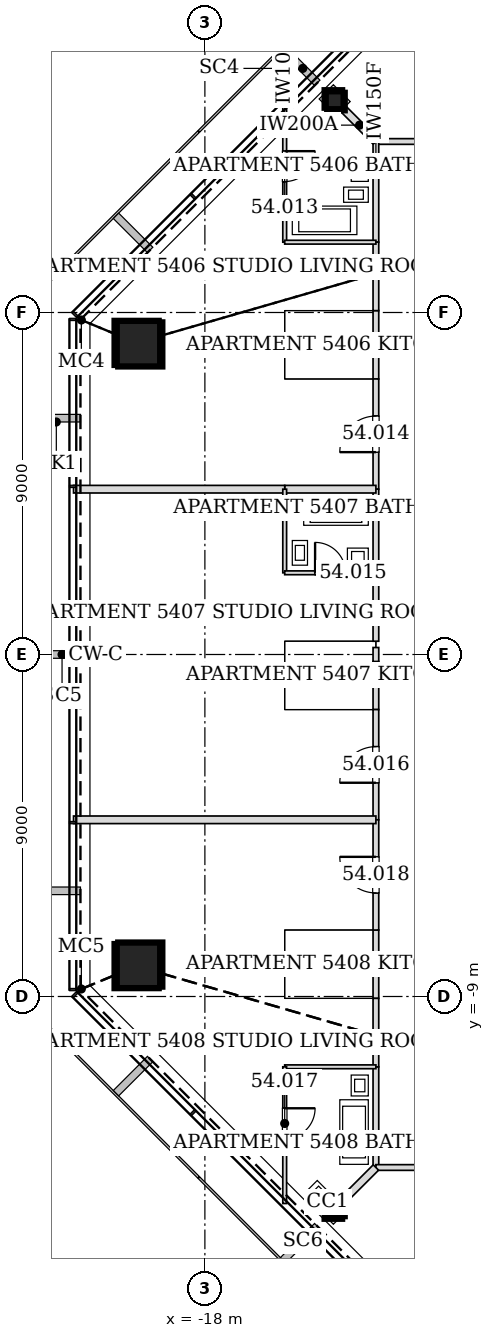
"""IFC4 building model, lengths in metres.
Left out: names, types, materials, properties, quantities, classifications, styles, units other than length and angle.
Written with IfcOpenShell. Run it as: python <this file> out.ifc"""

import sys

from ifc_helpers import new_model, si_unit, direction, frame, frame_2d, origin, origin_2d, place, context, subcontext, project, spatial, rectangle, hollow_rectangle, extrude, element, fill, save


model = new_model("IFC4")
c1 = context("Model", 3, precision=1e-05, world=origin(), true_north=direction((0.0, 1.0)))
c2 = subcontext(c1, "Body", "Model", "MODEL_VIEW")
j1 = project(units=[si_unit("LENGTHUNIT", "METRE"), si_unit("PLANEANGLEUNIT", "RADIAN")], contexts=[c1])
p1 = place(None, origin())
s1 = spatial("IfcSite", under=j1, at=p1, CompositionType="ELEMENT")
p2 = place(p1, origin())
s2 = spatial("IfcBuilding", under=s1, at=p2, CompositionType="ELEMENT")
p3 = place(p2, frame((0.0, 0.0, 231.2)))
s3 = spatial("IfcBuildingStorey", under=s2, at=p3, CompositionType="ELEMENT", Elevation=231.2)
for number, where, z_axis, x_axis in (
    (1, (-19.796, 8.2, 0.0), (0.028, -0.012, 1.0), (0.384, 0.923, 0.0)),
    (2, (-19.796, -8.2, 0.0), (0.028, 0.012, 1.0), (-0.384, 0.923, 0.0)),
):
    element("IfcColumn", number, at=place(p3, frame(where, z_axis=z_axis, x_axis=x_axis)), inside=s3, PredefinedType="COLUMN", context=c2, shape_type="SweptSolid", body=[
        extrude(hollow_rectangle(XDim=1.2, YDim=1.2, WallThickness=0.055, at=origin_2d()), origin(), (0.0, 0.0, 1.0), 3.402),
    ])
for number, where, z_axis, x_axis in (
    (3, (-14.619, 14.619, 0.0), (0.02, -0.02, 1.0), (0.707, 0.707, 0.0)),
    (4, (-20.674, 0.0, 0.0), (0.028, 0.0, 1.0), (0.0, 1.0, 0.0)),
    (5, (-14.619, -14.619, 0.0), (0.02, 0.02, 1.0), (-0.707, 0.707, 0.0)),
):
    element("IfcColumn", number, at=place(p3, frame(where, z_axis=z_axis, x_axis=x_axis)), inside=s3, PredefinedType="COLUMN", context=c2, shape_type="SweptSolid", body=[
        extrude(hollow_rectangle(XDim=0.5, YDim=0.5, WallThickness=0.025, at=origin_2d()), origin(), (0.0, 0.0, 1.0), 3.402),
    ])
p4 = place(p3, frame((-9.449, 13.5, 0.0), z_axis=(0.0, 0.0, 1.0), x_axis=(-1.0, 0.0, 0.0)))
e6 = element("IfcWall", 6, at=p4, inside=s3, PredefinedType="PARTITIONING", context=c2, shape_type="SweptSolid", body=[
    extrude(rectangle(XDim=4.051, YDim=0.15, at=frame_2d((2.025, 0.0))), origin(), (0.0, 0.0, 1.0), 2.344),
])
p5 = place(p3, frame((-13.5, 13.5, 0.0), z_axis=(0.0, 0.0, 1.0), x_axis=(0.0, -1.0, 0.0)))
e7 = element("IfcWall", 7, at=p5, inside=s3, PredefinedType="PARTITIONING", context=c2, shape_type="SweptSolid", body=[
    extrude(rectangle(XDim=2.651, YDim=0.15, at=frame_2d((1.325, 0.0))), origin(), (0.0, 0.0, 1.0), 2.583),
])
p6 = place(p3, frame((-13.5, 9.051, 0.0), z_axis=(0.0, 0.0, 1.0), x_axis=(0.0, -1.0, 0.0)))
e8 = element("IfcWall", 8, at=p6, inside=s3, PredefinedType="PARTITIONING", context=c2, shape_type="SweptSolid", body=[
    extrude(rectangle(XDim=1.802, YDim=0.15, at=frame_2d((0.901, 0.0))), origin(), (0.0, 0.0, 1.0), 3.2),
])
p7 = place(p3, frame((-13.5, 7.251, 0.0), z_axis=(0.0, 0.0, 1.0), x_axis=(0.0, -1.0, 0.0)))
e9 = element("IfcWall", 9, at=p7, inside=s3, PredefinedType="PARTITIONING", context=c2, shape_type="SweptSolid", body=[
    extrude(rectangle(XDim=2.902, YDim=0.15, at=frame_2d((1.451, 0.0))), origin(), (0.0, 0.0, 1.0), 3.2),
])
p8 = place(p7, frame((0.976, 0.0, 0.0)))
e10 = element("IfcOpeningElement", 10, at=p8, cuts=e9, PredefinedType="OPENING", context=c2, shape_type="SweptSolid", body=[
    extrude(rectangle(XDim=0.95, YDim=2.1, at=frame_2d((0.475, 1.05))), frame((0.0, 0.085, 0.0), z_axis=(0.0, -1.0, 0.0), x_axis=(1.0, 0.0, 0.0)), (0.0, 0.0, 1.0), 0.17),
])
p9 = place(p3, frame((-13.5, 10.851, 0.0), z_axis=(0.0, 0.0, 1.0), x_axis=(0.0, -1.0, 0.0)))
e11 = element("IfcWall", 11, at=p9, inside=s3, PredefinedType="PARTITIONING", context=c2, shape_type="SweptSolid", body=[
    extrude(rectangle(XDim=1.802, YDim=0.15, at=frame_2d((0.901, 0.0))), origin(), (0.0, 0.0, 1.0), 2.344),
])
p10 = place(p3, frame((-13.5, 4.351, 0.0), z_axis=(0.0, 0.0, 1.0), x_axis=(0.0, -1.0, 0.0)))
e12 = element("IfcWall", 12, at=p10, inside=s3, PredefinedType="PARTITIONING", context=c2, shape_type="SweptSolid", body=[
    extrude(rectangle(XDim=2.202, YDim=0.15, at=frame_2d((1.101, 0.0))), origin(), (0.0, 0.0, 1.0), 3.2),
])
p11 = place(p3, frame((-13.5, -0.184, 0.0), z_axis=(0.0, 0.0, 1.0), x_axis=(0.0, -1.0, 0.0)))
e13 = element("IfcWall", 13, at=p11, inside=s3, PredefinedType="PARTITIONING", context=c2, shape_type="SweptSolid", body=[
    extrude(rectangle(XDim=1.267, YDim=0.15, at=frame_2d((0.634, 0.0))), origin(), (0.0, 0.0, 1.0), 3.2),
])
p12 = place(p3, frame((-13.5, 0.184, 0.0), z_axis=(0.0, 0.0, 1.0), x_axis=(0.0, -1.0, 0.0)))
e14 = element("IfcWall", 14, at=p12, inside=s3, PredefinedType="PARTITIONING", context=c2, shape_type="SweptSolid", body=[
    extrude(rectangle(XDim=0.367, YDim=0.15, at=frame_2d((0.184, 0.0))), origin(), (0.0, 0.0, 1.0), 2.253),
])
p13 = place(p3, frame((-13.5, -1.449, 0.0), z_axis=(0.0, 0.0, 1.0), x_axis=(0.0, -1.0, 0.0)))
e15 = element("IfcWall", 15, at=p13, inside=s3, PredefinedType="PARTITIONING", context=c2, shape_type="SweptSolid", body=[
    extrude(rectangle(XDim=2.902, YDim=0.15, at=frame_2d((1.451, 0.0))), origin(), (0.0, 0.0, 1.0), 3.2),
])
p14 = place(p13, frame((0.976, 0.0, 0.0)))
e16 = element("IfcOpeningElement", 16, at=p14, cuts=e15, PredefinedType="OPENING", context=c2, shape_type="SweptSolid", body=[
    extrude(rectangle(XDim=0.95, YDim=2.1, at=frame_2d((0.475, 1.05))), frame((0.0, 0.085, 0.0), z_axis=(0.0, -1.0, 0.0), x_axis=(1.0, 0.0, 0.0)), (0.0, 0.0, 1.0), 0.17),
])
p15 = place(p3, frame((-13.5, 2.151, 0.0), z_axis=(0.0, 0.0, 1.0), x_axis=(0.0, -1.0, 0.0)))
e17 = element("IfcWall", 17, at=p15, inside=s3, PredefinedType="PARTITIONING", context=c2, shape_type="SweptSolid", body=[
    extrude(rectangle(XDim=1.802, YDim=0.15, at=frame_2d((0.901, 0.0))), origin(), (0.0, 0.0, 1.0), 3.2),
])
p16 = place(p3, frame((-13.5, -10.849, 0.0), z_axis=(0.0, 0.0, 1.0), x_axis=(0.0, -1.0, 0.0)))
e18 = element("IfcWall", 18, at=p16, inside=s3, PredefinedType="PARTITIONING", context=c2, shape_type="SweptSolid", body=[
    extrude(rectangle(XDim=2.651, YDim=0.15, at=frame_2d((1.325, 0.0))), origin(), (0.0, 0.0, 1.0), 2.583),
])
p17 = place(p3, frame((-13.5, -7.249, 0.0), z_axis=(0.0, 0.0, 1.0), x_axis=(0.0, -1.0, 0.0)))
e19 = element("IfcWall", 19, at=p17, inside=s3, PredefinedType="PARTITIONING", context=c2, shape_type="SweptSolid", body=[
    extrude(rectangle(XDim=1.802, YDim=0.15, at=frame_2d((0.901, 0.0))), origin(), (0.0, 0.0, 1.0), 3.2),
])
p18 = place(p3, frame((-13.5, -9.049, 0.0), z_axis=(0.0, 0.0, 1.0), x_axis=(0.0, -1.0, 0.0)))
e20 = element("IfcWall", 20, at=p18, inside=s3, PredefinedType="PARTITIONING", context=c2, shape_type="SweptSolid", body=[
    extrude(rectangle(XDim=1.802, YDim=0.15, at=frame_2d((0.901, 0.0))), origin(), (0.0, 0.0, 1.0), 2.344),
])
p19 = place(p3, frame((-13.5, -4.349, 0.0), z_axis=(0.0, 0.0, 1.0), x_axis=(0.0, -1.0, 0.0)))
e21 = element("IfcWall", 21, at=p19, inside=s3, PredefinedType="PARTITIONING", context=c2, shape_type="SweptSolid", body=[
    extrude(rectangle(XDim=2.902, YDim=0.15, at=frame_2d((1.451, 0.0))), origin(), (0.0, 0.0, 1.0), 3.2),
])
p20 = place(p19, frame((0.976, 0.0, 0.0)))
e22 = element("IfcOpeningElement", 22, at=p20, cuts=e21, PredefinedType="OPENING", context=c2, shape_type="SweptSolid", body=[
    extrude(rectangle(XDim=0.95, YDim=2.1, at=frame_2d((0.475, 1.05))), frame((0.0, 0.085, 0.0), z_axis=(0.0, -1.0, 0.0), x_axis=(1.0, 0.0, 0.0)), (0.0, 0.0, 1.0), 0.17),
])
p21 = place(p3, frame((-13.5, -13.5, 0.0), z_axis=(0.0, 0.0, 1.0), x_axis=(1.0, 0.0, 0.0)))
e23 = element("IfcWall", 23, at=p21, inside=s3, PredefinedType="PARTITIONING", context=c2, shape_type="SweptSolid", body=[
    extrude(rectangle(XDim=4.501, YDim=0.15, at=frame_2d((2.25, 0.0))), origin(), (0.0, 0.0, 1.0), 2.344),
])
p22 = place(p3, frame((-14.361, 14.361, 0.0), z_axis=(0.0, 0.0, 1.0), x_axis=(0.707106781187, -0.707106781187, 0.0)))
e24 = element("IfcWall", 24, at=p22, inside=s3, PredefinedType="PARTITIONING", context=c2, shape_type="SweptSolid", body=[
    extrude(rectangle(XDim=1.217, YDim=0.2, at=frame_2d((0.608, 0.0))), origin(), (0.0, 0.0, 1.0), 2.583),
])
p23 = place(p3, frame((-15.9, 14.448, 0.0), z_axis=(0.0, 0.0, 1.0), x_axis=(0.0, -1.0, 0.0)))
e25 = element("IfcWall", 25, at=p23, inside=s3, PredefinedType="PARTITIONING", context=c2, shape_type="SweptSolid", body=[
    extrude(rectangle(XDim=3.597, YDim=0.1, at=frame_2d((1.799, 0.0))), origin(), (0.0, 0.0, 1.0), 2.784),
])
p24 = place(p23, frame((1.202, 0.0, 0.0)))
e26 = element("IfcOpeningElement", 26, at=p24, cuts=e25, PredefinedType="OPENING", context=c2, shape_type="SweptSolid", body=[
    extrude(rectangle(XDim=0.8, YDim=2.1, at=frame_2d((0.4, 1.05))), frame((0.0, 0.06, 0.0), z_axis=(0.0, -1.0, 0.0), x_axis=(1.0, 0.0, 0.0)), (0.0, 0.0, 1.0), 0.12),
])
p25 = place(p3, frame((-15.9, 10.85, 0.0), z_axis=(0.0, 0.0, 1.0), x_axis=(1.0, 0.0, 0.0)))
e27 = element("IfcWall", 27, at=p25, inside=s3, PredefinedType="PARTITIONING", context=c2, shape_type="SweptSolid", body=[
    extrude(rectangle(XDim=2.4, YDim=0.1, at=frame_2d((1.2, 0.0))), origin(), (0.0, 0.0, 1.0), 2.786),
])
p26 = place(p3, frame((-15.901, 4.35, 0.0), z_axis=(0.0, 0.0, 1.0), x_axis=(1.0, 0.0, 0.0)))
e28 = element("IfcWall", 28, at=p26, inside=s3, PredefinedType="PARTITIONING", context=c2, shape_type="SweptSolid", body=[
    extrude(rectangle(XDim=2.401, YDim=0.2, at=frame_2d((1.2, 0.0))), origin(), (0.0, 0.0, 1.0), 2.664),
])
p27 = place(p3, frame((-21.456, 4.35, 0.0), z_axis=(0.0, 0.0, 1.0), x_axis=(1.0, 0.0, 0.0)))
e29 = element("IfcWall", 29, at=p27, inside=s3, PredefinedType="PARTITIONING", context=c2, shape_type="SweptSolid", body=[
    extrude(rectangle(XDim=5.557, YDim=0.2, at=frame_2d((2.779, 0.0))), origin(), (0.0, 0.0, 1.0), 2.662),
])
p28 = place(p3, frame((-15.9, 4.35, 0.0), z_axis=(0.0, 0.0, 1.0), x_axis=(0.0, -1.0, 0.0)))
e30 = element("IfcWall", 30, at=p28, inside=s3, PredefinedType="PARTITIONING", context=c2, shape_type="SweptSolid", body=[
    extrude(rectangle(XDim=2.2, YDim=0.1, at=frame_2d((1.1, 0.0))), origin(), (0.0, 0.0, 1.0), 3.2),
])
p29 = place(p3, frame((-15.9, 2.15, 0.0), z_axis=(0.0, 0.0, 1.0), x_axis=(1.0, 0.0, 0.0)))
e31 = element("IfcWall", 31, at=p29, inside=s3, PredefinedType="PARTITIONING", context=c2, shape_type="SweptSolid", body=[
    extrude(rectangle(XDim=2.4, YDim=0.1, at=frame_2d((1.2, 0.0))), origin(), (0.0, 0.0, 1.0), 2.664),
])
p30 = place(p29, frame((0.8, 0.0, 0.0)))
e32 = element("IfcOpeningElement", 32, at=p30, cuts=e31, PredefinedType="OPENING", context=c2, shape_type="SweptSolid", body=[
    extrude(rectangle(XDim=0.8, YDim=2.1, at=frame_2d((0.4, 1.05))), frame((0.0, 0.06, 0.0), z_axis=(0.0, -1.0, 0.0), x_axis=(1.0, 0.0, 0.0)), (0.0, 0.0, 1.0), 0.12),
])
p31 = place(p3, frame((-21.456, -4.35, 0.0), z_axis=(0.0, 0.0, 1.0), x_axis=(1.0, 0.0, 0.0)))
e33 = element("IfcWall", 33, at=p31, inside=s3, PredefinedType="PARTITIONING", context=c2, shape_type="SweptSolid", body=[
    extrude(rectangle(XDim=7.956, YDim=0.2, at=frame_2d((3.978, 0.0))), origin(), (0.0, 0.0, 1.0), 2.662),
])
p32 = place(p3, frame((-13.5, -10.85, 0.0), z_axis=(0.0, 0.0, 1.0), x_axis=(-1.0, 0.0, 0.0)))
e34 = element("IfcWall", 34, at=p32, inside=s3, PredefinedType="PARTITIONING", context=c2, shape_type="SweptSolid", body=[
    extrude(rectangle(XDim=2.4, YDim=0.1, at=frame_2d((1.2, 0.0))), origin(), (0.0, 0.0, 1.0), 2.786),
])
p33 = place(p3, frame((-15.9, -10.85, 0.0), z_axis=(0.0, 0.0, 1.0), x_axis=(0.0, -1.0, 0.0)))
e35 = element("IfcWall", 35, at=p33, inside=s3, PredefinedType="PARTITIONING", context=c2, shape_type="SweptSolid", body=[
    extrude(rectangle(XDim=3.597, YDim=0.1, at=frame_2d((1.799, 0.0))), origin(), (0.0, 0.0, 1.0), 2.784),
])
p34 = place(p33, frame((1.092, 0.0, 0.0)))
e36 = element("IfcOpeningElement", 36, at=p34, cuts=e35, PredefinedType="OPENING", context=c2, shape_type="SweptSolid", body=[
    extrude(rectangle(XDim=0.8, YDim=2.1, at=frame_2d((0.4, 1.05))), frame((0.0, 0.06, 0.0), z_axis=(0.0, -1.0, 0.0), x_axis=(1.0, 0.0, 0.0)), (0.0, 0.0, 1.0), 0.12),
])
p35 = place(p3, frame((-14.361, -14.361, 0.0), z_axis=(0.0, 0.0, 1.0), x_axis=(0.707106781187, 0.707106781187, 0.0)))
e37 = element("IfcWall", 37, at=p35, inside=s3, PredefinedType="PARTITIONING", context=c2, shape_type="SweptSolid", body=[
    extrude(rectangle(XDim=1.217, YDim=0.2, at=frame_2d((0.608, 0.0))), origin(), (0.0, 0.0, 1.0), 2.583),
])
p36 = place(p24, origin())
e38 = element("IfcDoor", 38, at=p36, inside=s3, OperationType="SINGLE_SWING_LEFT", PredefinedType="DOOR", context=c2, shape_type="SweptSolid", body=[
    extrude(rectangle(XDim=0.8, YDim=2.1, at=frame_2d((0.4, 1.05))), frame((0.0, 0.025, 0.0), z_axis=(0.0, -1.0, 0.0), x_axis=(1.0, 0.0, 0.0)), (0.0, 0.0, 1.0), 0.05),
])
fill(e26, e38)
p37 = place(p8, frame((0.95, 0.0, 0.0), z_axis=(0.0, 0.0, 1.0), x_axis=(-1.0, 0.0, 0.0)))
e39 = element("IfcDoor", 39, at=p37, inside=s3, OperationType="SINGLE_SWING_LEFT", PredefinedType="DOOR", context=c2, shape_type="SweptSolid", body=[
    extrude(rectangle(XDim=0.95, YDim=2.1, at=frame_2d((0.475, 1.05))), frame((0.0, 0.025, 0.0), z_axis=(0.0, -1.0, 0.0), x_axis=(1.0, 0.0, 0.0)), (0.0, 0.0, 1.0), 0.05),
])
fill(e10, e39)
p38 = place(p30, origin())
e40 = element("IfcDoor", 40, at=p38, inside=s3, OperationType="SINGLE_SWING_LEFT", PredefinedType="DOOR", context=c2, shape_type="SweptSolid", body=[
    extrude(rectangle(XDim=0.8, YDim=2.1, at=frame_2d((0.4, 1.05))), frame((0.0, 0.025, 0.0), z_axis=(0.0, -1.0, 0.0), x_axis=(1.0, 0.0, 0.0)), (0.0, 0.0, 1.0), 0.05),
])
fill(e32, e40)
p39 = place(p14, frame((0.95, 0.0, 0.0), z_axis=(0.0, 0.0, 1.0), x_axis=(-1.0, 0.0, 0.0)))
e41 = element("IfcDoor", 41, at=p39, inside=s3, OperationType="SINGLE_SWING_LEFT", PredefinedType="DOOR", context=c2, shape_type="SweptSolid", body=[
    extrude(rectangle(XDim=0.95, YDim=2.1, at=frame_2d((0.475, 1.05))), frame((0.0, 0.025, 0.0), z_axis=(0.0, -1.0, 0.0), x_axis=(1.0, 0.0, 0.0)), (0.0, 0.0, 1.0), 0.05),
])
fill(e16, e41)
p40 = place(p34, origin())
e42 = element("IfcDoor", 42, at=p40, inside=s3, OperationType="SINGLE_SWING_LEFT", PredefinedType="DOOR", context=c2, shape_type="SweptSolid", body=[
    extrude(rectangle(XDim=0.8, YDim=2.1, at=frame_2d((0.4, 1.05))), frame((0.0, 0.025, 0.0), z_axis=(0.0, -1.0, 0.0), x_axis=(1.0, 0.0, 0.0)), (0.0, 0.0, 1.0), 0.05),
])
fill(e36, e42)
p41 = place(p20, frame((0.95, 0.0, 0.0), z_axis=(0.0, 0.0, 1.0), x_axis=(-1.0, 0.0, 0.0)))
e43 = element("IfcDoor", 43, at=p41, inside=s3, OperationType="SINGLE_SWING_RIGHT", PredefinedType="DOOR", context=c2, shape_type="SweptSolid", body=[
    extrude(rectangle(XDim=0.95, YDim=2.1, at=frame_2d((0.475, 1.05))), frame((0.0, 0.025, 0.0), z_axis=(0.0, -1.0, 0.0), x_axis=(1.0, 0.0, 0.0)), (0.0, 0.0, 1.0), 0.05),
])
fill(e22, e43)
save(model, sys.argv[1])
